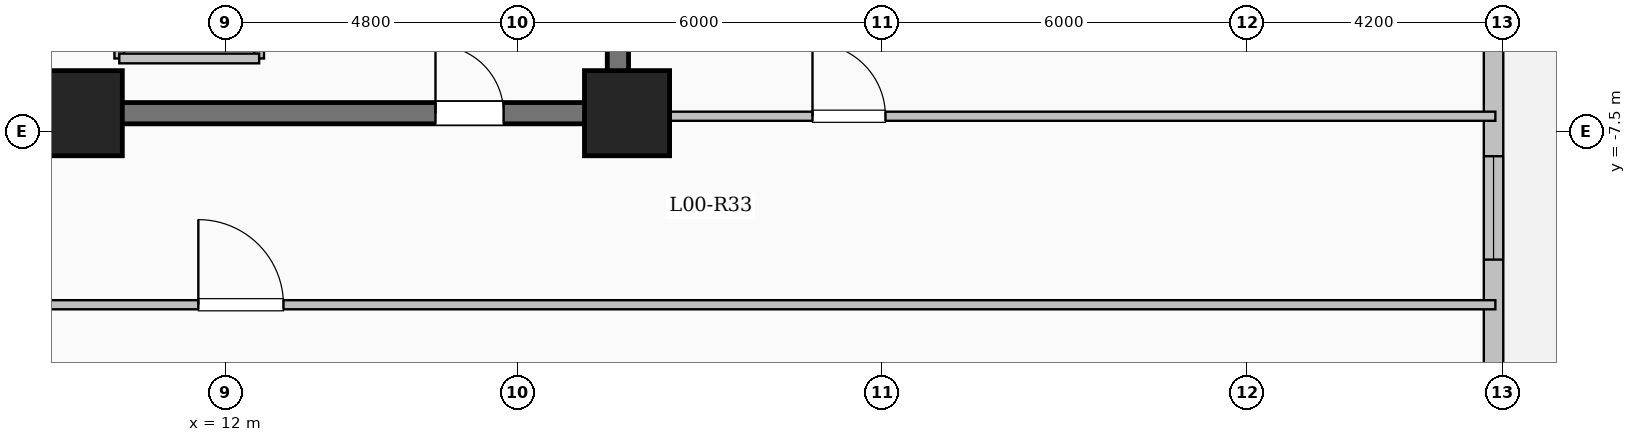
"""IFC4 building model, lengths in metres.
Left out: names, types, materials, properties, quantities, classifications, styles, units other than length and angle.
Written with IfcOpenShell. Run it as: python <this file> out.ifc"""

import sys

from ifc_helpers import new_model, si_unit, direction, frame, frame_2d, origin, origin_2d, place, context, subcontext, project, spatial, rectangle, extrude, element, fill, save


model = new_model("IFC4")
c1 = context("Model", 3, precision=1e-05, world=origin(), true_north=direction((0.0, 1.0)))
c2 = subcontext(c1, "Body", "Model", "MODEL_VIEW")
j1 = project(units=[si_unit("LENGTHUNIT", "METRE"), si_unit("PLANEANGLEUNIT", "RADIAN")], contexts=[c1])
p1 = place(None, origin())
s1 = spatial("IfcSite", under=j1, at=p1, CompositionType="ELEMENT")
p2 = place(p1, origin())
s2 = spatial("IfcBuilding", under=s1, at=p2, CompositionType="ELEMENT")
p3 = place(p2, origin())
s3 = spatial("IfcBuildingStorey", under=s2, at=p3, CompositionType="ELEMENT", Elevation=0.0)
for number, where, z_axis, x_axis in (
    (1, (9.6, -7.2, 0.0), (0.0, 0.0, 1.0), (1.0, 0.0, 0.0)),
    (2, (18.6, -7.2, 0.0), (0.0, 0.0, 1.0), (1.0, 0.0, 0.0)),
):
    element("IfcColumn", number, at=place(p3, frame(where, z_axis=z_axis, x_axis=x_axis)), inside=s3, PredefinedType="COLUMN", context=c2, shape_type="SweptSolid", body=[
        extrude(rectangle(XDim=1.4, YDim=1.4, at=origin_2d()), origin(), (0.0, 0.0, 1.0), 5.4),
    ])
p4 = place(p3, frame((32.85, 29.85, 0.0), z_axis=(0.0, 0.0, 1.0), x_axis=(0.0, -1.0, 0.0)))
e3 = element("IfcWall", 3, at=p4, inside=s3, PredefinedType="SOLIDWALL", context=c2, shape_type="SweptSolid", body=[
    extrude(rectangle(XDim=59.7, YDim=0.32, at=frame_2d((29.85, 0.0))), origin(), (0.0, 0.0, 1.0), 5.1),
])
p5 = place(p4, frame((17.55, 0.0, 0.0)))
e4 = element("IfcOpeningElement", 4, at=p5, cuts=e3, PredefinedType="OPENING", context=c2, shape_type="SweptSolid", body=[
    extrude(rectangle(XDim=1.35, YDim=2.2, at=frame_2d((0.675, 1.1))), frame((0.0, 0.17, 0.0), z_axis=(0.0, -1.0, 0.0), x_axis=(1.0, 0.0, 0.0)), (0.0, 0.0, 1.0), 0.34),
])
p6 = place(p4, frame((46.65, 0.0, 0.0)))
e5 = element("IfcOpeningElement", 5, at=p6, cuts=e3, PredefinedType="OPENING", context=c2, shape_type="SweptSolid", body=[
    extrude(rectangle(XDim=2.0, YDim=2.4, at=frame_2d((1.0, 1.2))), frame((0.0, 0.17, 0.0), z_axis=(0.0, -1.0, 0.0), x_axis=(1.0, 0.0, 0.0)), (0.0, 0.0, 1.0), 0.34),
])
p7 = place(p4, frame((24.35, 0.0, 0.0)))
e6 = element("IfcOpeningElement", 6, at=p7, cuts=e3, PredefinedType="OPENING", context=c2, shape_type="SweptSolid", body=[
    extrude(rectangle(XDim=3.0, YDim=2.8, at=frame_2d((1.5, 1.4))), frame((0.0, 0.17, 0.0), z_axis=(0.0, -1.0, 0.0), x_axis=(1.0, 0.0, 0.0)), (0.0, 0.0, 1.0), 0.34),
])
p8 = place(p4, frame((7.6, 0.0, 0.9)))
e7 = element("IfcOpeningElement", 7, at=p8, cuts=e3, PredefinedType="OPENING", context=c2, shape_type="SweptSolid", body=[
    extrude(rectangle(XDim=2.1, YDim=2.0, at=frame_2d((1.05, 1.0))), frame((0.0, 0.17, 0.0), z_axis=(0.0, -1.0, 0.0), x_axis=(1.0, 0.0, 0.0)), (0.0, 0.0, 1.0), 0.34),
])
p9 = place(p4, frame((37.758, 0.0, 0.9)))
e8 = element("IfcOpeningElement", 8, at=p9, cuts=e3, PredefinedType="OPENING", context=c2, shape_type="SweptSolid", body=[
    extrude(rectangle(XDim=1.7, YDim=1.9, at=frame_2d((0.85, 0.95))), frame((0.0, 0.17, 0.0), z_axis=(0.0, -1.0, 0.0), x_axis=(1.0, 0.0, 0.0)), (0.0, 0.0, 1.0), 0.34),
])
p10 = place(p4, frame((42.415, 0.0, 0.9)))
e9 = element("IfcOpeningElement", 9, at=p10, cuts=e3, PredefinedType="OPENING", context=c2, shape_type="SweptSolid", body=[
    extrude(rectangle(XDim=2.1, YDim=2.0, at=frame_2d((1.05, 1.0))), frame((0.0, 0.17, 0.0), z_axis=(0.0, -1.0, 0.0), x_axis=(1.0, 0.0, 0.0)), (0.0, 0.0, 1.0), 0.34),
])
p11 = place(p4, frame((55.2, 0.0, 0.9)))
e10 = element("IfcOpeningElement", 10, at=p11, cuts=e3, PredefinedType="OPENING", context=c2, shape_type="SweptSolid", body=[
    extrude(rectangle(XDim=2.1, YDim=2.0, at=frame_2d((1.05, 1.0))), frame((0.0, 0.17, 0.0), z_axis=(0.0, -1.0, 0.0), x_axis=(1.0, 0.0, 0.0)), (0.0, 0.0, 1.0), 0.34),
])
p12 = place(p3, frame((10.25, -6.3, 0.0), z_axis=(0.0, 0.0, 1.0), x_axis=(0.0, 1.0, 0.0)))
e11 = element("IfcWall", 11, at=p12, inside=s3, PredefinedType="SOLIDWALL", context=c2, shape_type="SweptSolid", body=[
    extrude(rectangle(XDim=2.6, YDim=0.16, at=frame_2d((1.3, 0.0))), origin(), (0.0, 0.0, 1.0), 5.1),
])
p13 = place(p12, frame((0.75, 0.0, 0.0)))
e12 = element("IfcOpeningElement", 12, at=p13, cuts=e11, PredefinedType="OPENING", context=c2, shape_type="SweptSolid", body=[
    extrude(rectangle(XDim=1.1, YDim=2.15, at=frame_2d((0.55, 1.075))), frame((0.0, 0.09, 0.0), z_axis=(0.0, -1.0, 0.0), x_axis=(1.0, 0.0, 0.0)), (0.0, 0.0, 1.0), 0.18),
])
p14 = place(p3, frame((12.55, -6.3, 0.0), z_axis=(0.0, 0.0, 1.0), x_axis=(0.0, 1.0, 0.0)))
e13 = element("IfcWall", 13, at=p14, inside=s3, PredefinedType="SOLIDWALL", context=c2, shape_type="SweptSolid", body=[
    extrude(rectangle(XDim=2.6, YDim=0.16, at=frame_2d((1.3, 0.0))), origin(), (0.0, 0.0, 1.0), 5.1),
])
p15 = place(p3, frame((10.25, -6.3, 0.0), z_axis=(0.0, 0.0, 1.0), x_axis=(1.0, 0.0, 0.0)))
e14 = element("IfcWall", 14, at=p15, inside=s3, PredefinedType="SOLIDWALL", context=c2, shape_type="SweptSolid", body=[
    extrude(rectangle(XDim=2.3, YDim=0.16, at=frame_2d((1.15, 0.0))), origin(), (0.0, 0.0, 1.0), 5.1),
])
p16 = place(p3, frame((18.45, -7.375, 0.0), z_axis=(0.0, 0.0, 1.0), x_axis=(0.0, 1.0, 0.0)))
e15 = element("IfcWall", 15, at=p16, inside=s3, PredefinedType="SHEAR", context=c2, shape_type="SweptSolid", body=[
    extrude(rectangle(XDim=14.05, YDim=0.35, at=frame_2d((7.025, 0.0))), origin(), (0.0, 0.0, 1.0), 5.4),
])
p17 = place(p3, frame((10.075, -7.2, 0.0), z_axis=(0.0, 0.0, 1.0), x_axis=(1.0, 0.0, 0.0)))
e16 = element("IfcWall", 16, at=p17, inside=s3, PredefinedType="SHEAR", context=c2, shape_type="SweptSolid", body=[
    extrude(rectangle(XDim=8.55, YDim=0.35, at=frame_2d((4.275, 0.0))), origin(), (0.0, 0.0, 1.0), 5.4),
])
p18 = place(p17, frame((5.375, 0.0, 0.0)))
e17 = element("IfcOpeningElement", 17, at=p18, cuts=e16, PredefinedType="OPENING", context=c2, shape_type="SweptSolid", body=[
    extrude(rectangle(XDim=1.12, YDim=2.15, at=frame_2d((0.56, 1.075))), frame((0.0, 0.185, 0.0), z_axis=(0.0, -1.0, 0.0), x_axis=(1.0, 0.0, 0.0)), (0.0, 0.0, 1.0), 0.37),
])
p19 = place(p3, frame((8.55, -10.35, 0.0), z_axis=(0.0, 0.0, 1.0), x_axis=(1.0, 0.0, 0.0)))
e18 = element("IfcWall", 18, at=p19, inside=s3, PredefinedType="PARTITIONING", context=c2, shape_type="SweptSolid", body=[
    extrude(rectangle(XDim=24.33, YDim=0.15, at=frame_2d((12.165, 0.0))), origin(), (0.0, 0.0, 1.0), 5.1),
])
p20 = place(p19, frame((3.0, 0.0, 0.0)))
e19 = element("IfcOpeningElement", 19, at=p20, cuts=e18, PredefinedType="OPENING", context=c2, shape_type="SweptSolid", body=[
    extrude(rectangle(XDim=1.4, YDim=2.2, at=frame_2d((0.7, 1.1))), frame((0.0, 0.085, 0.0), z_axis=(0.0, -1.0, 0.0), x_axis=(1.0, 0.0, 0.0)), (0.0, 0.0, 1.0), 0.17),
])
p21 = place(p3, frame((18.45, -7.25, 0.0), z_axis=(0.0, 0.0, 1.0), x_axis=(1.0, 0.0, 0.0)))
e20 = element("IfcWall", 20, at=p21, inside=s3, PredefinedType="PARTITIONING", context=c2, shape_type="SweptSolid", body=[
    extrude(rectangle(XDim=14.43, YDim=0.15, at=frame_2d((7.215, 0.0))), origin(), (0.0, 0.0, 1.0), 5.1),
])
p22 = place(p21, frame((3.2, 0.0, 0.0)))
e21 = element("IfcOpeningElement", 21, at=p22, cuts=e20, PredefinedType="OPENING", context=c2, shape_type="SweptSolid", body=[
    extrude(rectangle(XDim=1.2, YDim=2.2, at=frame_2d((0.6, 1.1))), frame((0.0, 0.085, 0.0), z_axis=(0.0, -1.0, 0.0), x_axis=(1.0, 0.0, 0.0)), (0.0, 0.0, 1.0), 0.17),
])
p23 = place(p9, origin())
e22 = element("IfcWindow", 22, at=p23, inside=s3, PartitioningType="SINGLE_PANEL", PredefinedType="WINDOW", context=c2, shape_type="SweptSolid", body=[
    extrude(rectangle(XDim=1.7, YDim=1.9, at=frame_2d((0.85, 0.95))), frame((0.0, 0.03, 0.0), z_axis=(0.0, -1.0, 0.0), x_axis=(1.0, 0.0, 0.0)), (0.0, 0.0, 1.0), 0.06),
])
fill(e8, e22)
p24 = place(p18, origin())
e23 = element("IfcDoor", 23, at=p24, inside=s3, OperationType="SINGLE_SWING_LEFT", PredefinedType="DOOR", context=c2, shape_type="SweptSolid", body=[
    extrude(rectangle(XDim=1.12, YDim=2.15, at=frame_2d((0.56, 1.075))), frame((0.0, 0.025, 0.0), z_axis=(0.0, -1.0, 0.0), x_axis=(1.0, 0.0, 0.0)), (0.0, 0.0, 1.0), 0.05),
])
fill(e17, e23)
p25 = place(p20, origin())
e24 = element("IfcDoor", 24, at=p25, inside=s3, OperationType="SINGLE_SWING_LEFT", PredefinedType="DOOR", context=c2, shape_type="SweptSolid", body=[
    extrude(rectangle(XDim=1.4, YDim=2.2, at=frame_2d((0.7, 1.1))), frame((0.0, 0.025, 0.0), z_axis=(0.0, -1.0, 0.0), x_axis=(1.0, 0.0, 0.0)), (0.0, 0.0, 1.0), 0.05),
])
fill(e19, e24)
p26 = place(p22, origin())
e25 = element("IfcDoor", 25, at=p26, inside=s3, OperationType="SINGLE_SWING_LEFT", PredefinedType="DOOR", context=c2, shape_type="SweptSolid", body=[
    extrude(rectangle(XDim=1.2, YDim=2.2, at=frame_2d((0.6, 1.1))), frame((0.0, 0.025, 0.0), z_axis=(0.0, -1.0, 0.0), x_axis=(1.0, 0.0, 0.0)), (0.0, 0.0, 1.0), 0.05),
])
fill(e21, e25)
save(model, sys.argv[1])
